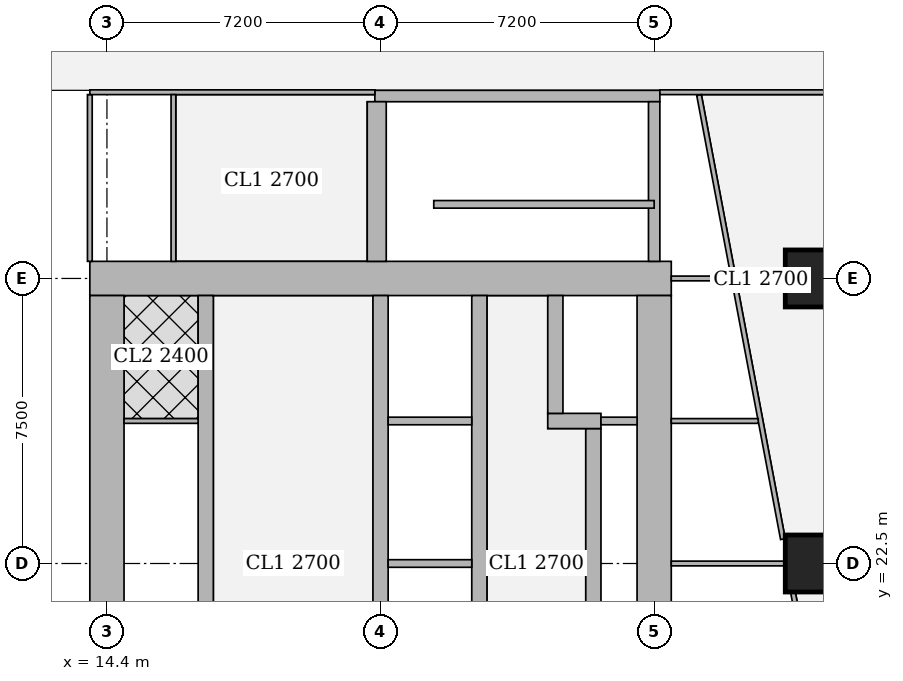
"""IFC4 building model, lengths in metres.
Left out: names, types, materials, properties, quantities, classifications, styles, units other than length and angle.
Written with IfcOpenShell. Run it as: python <this file> out.ifc"""

import sys

from ifc_helpers import new_model, si_unit, direction, frame, frame_2d, origin, origin_2d, place, context, subcontext, project, spatial, rectangle, extrude, element, fill, save


model = new_model("IFC4")
c1 = context("Model", 3, precision=1e-05, world=origin(), true_north=direction((0.0, 1.0)))
c2 = subcontext(c1, "Body", "Model", "MODEL_VIEW")
j1 = project(units=[si_unit("LENGTHUNIT", "METRE"), si_unit("PLANEANGLEUNIT", "RADIAN")], contexts=[c1])
p1 = place(None, origin())
s1 = spatial("IfcSite", under=j1, at=p1, CompositionType="ELEMENT")
p2 = place(p1, origin())
s2 = spatial("IfcBuilding", under=s1, at=p2, CompositionType="ELEMENT")
p3 = place(p2, frame((0.0, 0.0, 147.05)))
s3 = spatial("IfcBuildingStorey", under=s2, at=p3, CompositionType="ELEMENT", Elevation=147.05)
for number, where, z_axis, x_axis in (
    (1, (33.0, 22.5, 0.0), (0.0, 0.0, 1.0), (1.0, 0.0, 0.0)),
    (2, (33.0, 30.0, 0.0), (0.0, 0.0, 1.0), (1.0, 0.0, 0.0)),
):
    element("IfcColumn", number, at=place(p3, frame(where, z_axis=z_axis, x_axis=x_axis)), inside=s3, PredefinedType="COLUMN", context=c2, shape_type="SweptSolid", body=[
        extrude(rectangle(XDim=1.5, YDim=1.5, at=origin_2d()), origin(), (0.0, 0.0, 1.0), 3.75),
    ])
p4 = place(p3, frame((13.95, 30.0, 0.0), z_axis=(0.0, 0.0, 1.0), x_axis=(1.0, 0.0, 0.0)))
e3 = element("IfcWall", 3, at=p4, inside=s3, PredefinedType="SHEAR", context=c2, shape_type="SweptSolid", body=[
    extrude(rectangle(XDim=15.3, YDim=0.9, at=frame_2d((7.65, 0.0))), origin(), (0.0, 0.0, 1.0), 3.75),
])
p5 = place(p4, frame((4.45, 0.0, 0.0)))
e4 = element("IfcOpeningElement", 4, at=p5, cuts=e3, PredefinedType="OPENING", context=c2, shape_type="SweptSolid", body=[
    extrude(rectangle(XDim=1.8, YDim=2.1, at=frame_2d((0.9, 1.05))), frame((0.0, 0.46, 0.0), z_axis=(0.0, -1.0, 0.0), x_axis=(1.0, 0.0, 0.0)), (0.0, 0.0, 1.0), 0.92),
])
p6 = place(p4, frame((10.7, 0.0, 0.0)))
e5 = element("IfcOpeningElement", 5, at=p6, cuts=e3, PredefinedType="OPENING", context=c2, shape_type="SweptSolid", body=[
    extrude(rectangle(XDim=1.1, YDim=2.1, at=frame_2d((0.55, 1.05))), frame((0.0, 0.46, 0.0), z_axis=(0.0, -1.0, 0.0), x_axis=(1.0, 0.0, 0.0)), (0.0, 0.0, 1.0), 0.92),
])
for number, where, z_axis, x_axis in (
    (6, (14.4, 15.45, 0.0), (0.0, 0.0, 1.0), (0.0, 1.0, 0.0)),
    (7, (28.8, 15.45, 0.0), (0.0, 0.0, 1.0), (0.0, 1.0, 0.0)),
):
    element("IfcWall", number, at=place(p3, frame(where, z_axis=z_axis, x_axis=x_axis)), inside=s3, PredefinedType="SHEAR", context=c2, shape_type="SweptSolid", body=[
        extrude(rectangle(XDim=14.1, YDim=0.9, at=frame_2d((7.05, 0.0))), origin(), (0.0, 0.0, 1.0), 3.75),
    ])
p7 = place(p3, frame((17.0, 15.45, 0.0), z_axis=(0.0, 0.0, 1.0), x_axis=(0.0, 1.0, 0.0)))
e8 = element("IfcWall", 8, at=p7, inside=s3, PredefinedType="SHEAR", context=c2, shape_type="SweptSolid", body=[
    extrude(rectangle(XDim=14.1, YDim=0.4, at=frame_2d((7.05, 0.0))), origin(), (0.0, 0.0, 1.0), 3.75),
])
p8 = place(p7, frame((0.925, 0.0, 0.0)))
e9 = element("IfcOpeningElement", 9, at=p8, cuts=e8, PredefinedType="OPENING", context=c2, shape_type="SweptSolid", body=[
    extrude(rectangle(XDim=1.0, YDim=2.1, at=frame_2d((0.5, 1.05))), frame((0.0, 0.21, 0.0), z_axis=(0.0, -1.0, 0.0), x_axis=(1.0, 0.0, 0.0)), (0.0, 0.0, 1.0), 0.42),
])
p9 = place(p7, frame((4.675, 0.0, 0.0)))
e10 = element("IfcOpeningElement", 10, at=p9, cuts=e8, PredefinedType="OPENING", context=c2, shape_type="SweptSolid", body=[
    extrude(rectangle(XDim=1.0, YDim=2.1, at=frame_2d((0.5, 1.05))), frame((0.0, 0.21, 0.0), z_axis=(0.0, -1.0, 0.0), x_axis=(1.0, 0.0, 0.0)), (0.0, 0.0, 1.0), 0.42),
])
p10 = place(p7, frame((8.425, 0.0, 0.0)))
e11 = element("IfcOpeningElement", 11, at=p10, cuts=e8, PredefinedType="OPENING", context=c2, shape_type="SweptSolid", body=[
    extrude(rectangle(XDim=1.0, YDim=2.1, at=frame_2d((0.5, 1.05))), frame((0.0, 0.21, 0.0), z_axis=(0.0, -1.0, 0.0), x_axis=(1.0, 0.0, 0.0)), (0.0, 0.0, 1.0), 0.42),
])
p11 = place(p7, frame((12.175, 0.0, 0.0)))
e12 = element("IfcOpeningElement", 12, at=p11, cuts=e8, PredefinedType="OPENING", context=c2, shape_type="SweptSolid", body=[
    extrude(rectangle(XDim=1.0, YDim=2.1, at=frame_2d((0.5, 1.05))), frame((0.0, 0.21, 0.0), z_axis=(0.0, -1.0, 0.0), x_axis=(1.0, 0.0, 0.0)), (0.0, 0.0, 1.0), 0.42),
])
p12 = place(p3, frame((21.6, 15.45, 0.0), z_axis=(0.0, 0.0, 1.0), x_axis=(0.0, 1.0, 0.0)))
e13 = element("IfcWall", 13, at=p12, inside=s3, PredefinedType="SHEAR", context=c2, shape_type="SweptSolid", body=[
    extrude(rectangle(XDim=14.1, YDim=0.4, at=frame_2d((7.05, 0.0))), origin(), (0.0, 0.0, 1.0), 3.75),
])
p13 = place(p12, frame((0.875, 0.0, 0.0)))
e14 = element("IfcOpeningElement", 14, at=p13, cuts=e13, PredefinedType="OPENING", context=c2, shape_type="SweptSolid", body=[
    extrude(rectangle(XDim=1.1, YDim=2.1, at=frame_2d((0.55, 1.05))), frame((0.0, 0.21, 0.0), z_axis=(0.0, -1.0, 0.0), x_axis=(1.0, 0.0, 0.0)), (0.0, 0.0, 1.0), 0.42),
])
p14 = place(p12, frame((4.625, 0.0, 0.0)))
e15 = element("IfcOpeningElement", 15, at=p14, cuts=e13, PredefinedType="OPENING", context=c2, shape_type="SweptSolid", body=[
    extrude(rectangle(XDim=1.1, YDim=2.1, at=frame_2d((0.55, 1.05))), frame((0.0, 0.21, 0.0), z_axis=(0.0, -1.0, 0.0), x_axis=(1.0, 0.0, 0.0)), (0.0, 0.0, 1.0), 0.42),
])
p15 = place(p12, frame((8.375, 0.0, 0.0)))
e16 = element("IfcOpeningElement", 16, at=p15, cuts=e13, PredefinedType="OPENING", context=c2, shape_type="SweptSolid", body=[
    extrude(rectangle(XDim=1.1, YDim=2.1, at=frame_2d((0.55, 1.05))), frame((0.0, 0.21, 0.0), z_axis=(0.0, -1.0, 0.0), x_axis=(1.0, 0.0, 0.0)), (0.0, 0.0, 1.0), 0.42),
])
p16 = place(p12, frame((12.125, 0.0, 0.0)))
e17 = element("IfcOpeningElement", 17, at=p16, cuts=e13, PredefinedType="OPENING", context=c2, shape_type="SweptSolid", body=[
    extrude(rectangle(XDim=1.1, YDim=2.1, at=frame_2d((0.55, 1.05))), frame((0.0, 0.21, 0.0), z_axis=(0.0, -1.0, 0.0), x_axis=(1.0, 0.0, 0.0)), (0.0, 0.0, 1.0), 0.42),
])
p17 = place(p3, frame((24.2, 15.45, 0.0), z_axis=(0.0, 0.0, 1.0), x_axis=(0.0, 1.0, 0.0)))
e18 = element("IfcWall", 18, at=p17, inside=s3, PredefinedType="SHEAR", context=c2, shape_type="SweptSolid", body=[
    extrude(rectangle(XDim=14.1, YDim=0.4, at=frame_2d((7.05, 0.0))), origin(), (0.0, 0.0, 1.0), 3.75),
])
p18 = place(p3, frame((27.2, 18.95, 0.0), z_axis=(0.0, 0.0, 1.0), x_axis=(0.0, 1.0, 0.0)))
e19 = element("IfcWall", 19, at=p18, inside=s3, PredefinedType="SHEAR", context=c2, shape_type="SweptSolid", body=[
    extrude(rectangle(XDim=7.1, YDim=0.4, at=frame_2d((3.55, 0.0))), origin(), (0.0, 0.0, 1.0), 3.75),
])
p19 = place(p3, frame((26.0, 26.25, 0.0), z_axis=(0.0, 0.0, 1.0), x_axis=(1.0, 0.0, 0.0)))
e20 = element("IfcWall", 20, at=p19, inside=s3, PredefinedType="SHEAR", context=c2, shape_type="SweptSolid", body=[
    extrude(rectangle(XDim=1.4, YDim=0.4, at=frame_2d((0.7, 0.0))), origin(), (0.0, 0.0, 1.0), 3.75),
])
p20 = place(p3, frame((26.2, 26.45, 0.0), z_axis=(0.0, 0.0, 1.0), x_axis=(0.0, 1.0, 0.0)))
e21 = element("IfcWall", 21, at=p20, inside=s3, PredefinedType="SHEAR", context=c2, shape_type="SweptSolid", body=[
    extrude(rectangle(XDim=3.1, YDim=0.4, at=frame_2d((1.55, 0.0))), origin(), (0.0, 0.0, 1.0), 3.75),
])
p21 = place(p20, frame((1.075, 0.0, 0.0)))
e22 = element("IfcOpeningElement", 22, at=p21, cuts=e21, PredefinedType="OPENING", context=c2, shape_type="SweptSolid", body=[
    extrude(rectangle(XDim=1.2, YDim=2.1, at=frame_2d((0.6, 1.05))), frame((0.0, 0.21, 0.0), z_axis=(0.0, -1.0, 0.0), x_axis=(1.0, 0.0, 0.0)), (0.0, 0.0, 1.0), 0.42),
])
p22 = place(p3, frame((21.45, 34.8, 0.0), z_axis=(0.0, 0.0, 1.0), x_axis=(1.0, 0.0, 0.0)))
e23 = element("IfcWall", 23, at=p22, inside=s3, PredefinedType="SHEAR", context=c2, shape_type="SweptSolid", body=[
    extrude(rectangle(XDim=7.5, YDim=0.3, at=frame_2d((3.75, 0.0))), origin(), (0.0, 0.0, 1.0), 3.75),
])
p23 = place(p22, frame((0.5, 0.0, 0.0)))
e24 = element("IfcOpeningElement", 24, at=p23, cuts=e23, PredefinedType="OPENING", context=c2, shape_type="SweptSolid", body=[
    extrude(rectangle(XDim=1.1, YDim=2.1, at=frame_2d((0.55, 1.05))), frame((0.0, 0.16, 0.0), z_axis=(0.0, -1.0, 0.0), x_axis=(1.0, 0.0, 0.0)), (0.0, 0.0, 1.0), 0.32),
])
p24 = place(p3, frame((21.5, 30.45, 0.0), z_axis=(0.0, 0.0, 1.0), x_axis=(0.0, 1.0, 0.0)))
e25 = element("IfcWall", 25, at=p24, inside=s3, PredefinedType="SHEAR", context=c2, shape_type="SweptSolid", body=[
    extrude(rectangle(XDim=4.2, YDim=0.5, at=frame_2d((2.1, 0.0))), origin(), (0.0, 0.0, 1.0), 3.75),
])
p25 = place(p3, frame((28.8, 30.45, 0.0), z_axis=(0.0, 0.0, 1.0), x_axis=(0.0, 1.0, 0.0)))
e26 = element("IfcWall", 26, at=p25, inside=s3, PredefinedType="SHEAR", context=c2, shape_type="SweptSolid", body=[
    extrude(rectangle(XDim=4.2, YDim=0.3, at=frame_2d((2.1, 0.0))), origin(), (0.0, 0.0, 1.0), 3.75),
])
p26 = place(p3, frame((13.95, 30.45, 0.0), z_axis=(0.0, 0.0, 1.0), x_axis=(0.0, 1.0, 0.0)))
e27 = element("IfcWall", 27, at=p26, inside=s3, PredefinedType="PARTITIONING", context=c2, shape_type="SweptSolid", body=[
    extrude(rectangle(XDim=4.387, YDim=0.125, at=frame_2d((2.193, 0.0))), origin(), (0.0, 0.0, 1.0), 3.5),
])
p27 = place(p3, frame((13.95, 34.9, 0.0), z_axis=(0.0, 0.0, 1.0), x_axis=(1.0, 0.0, 0.0)))
e28 = element("IfcWall", 28, at=p27, inside=s3, PredefinedType="PARTITIONING", context=c2, shape_type="SweptSolid", body=[
    extrude(rectangle(XDim=7.5, YDim=0.125, at=frame_2d((3.75, 0.0))), origin(), (0.0, 0.0, 1.0), 3.5),
])
p28 = place(p27, frame((3.95, 0.0, 0.0)))
e29 = element("IfcOpeningElement", 29, at=p28, cuts=e28, PredefinedType="OPENING", context=c2, shape_type="SweptSolid", body=[
    extrude(rectangle(XDim=1.8, YDim=2.1, at=frame_2d((0.9, 1.05))), frame((0.0, 0.073, 0.0), z_axis=(0.0, -1.0, 0.0), x_axis=(1.0, 0.0, 0.0)), (0.0, 0.0, 1.0), 0.145),
])
p29 = place(p3, frame((16.15, 30.45, 0.0), z_axis=(0.0, 0.0, 1.0), x_axis=(0.0, 1.0, 0.0)))
e30 = element("IfcWall", 30, at=p29, inside=s3, PredefinedType="PARTITIONING", context=c2, shape_type="SweptSolid", body=[
    extrude(rectangle(XDim=4.387, YDim=0.125, at=frame_2d((2.193, 0.0))), origin(), (0.0, 0.0, 1.0), 3.5),
])
p30 = place(p29, frame((1.75, 0.0, 0.0)))
e31 = element("IfcOpeningElement", 31, at=p30, cuts=e30, PredefinedType="OPENING", context=c2, shape_type="SweptSolid", body=[
    extrude(rectangle(XDim=1.0, YDim=2.1, at=frame_2d((0.5, 1.05))), frame((0.0, 0.073, 0.0), z_axis=(0.0, -1.0, 0.0), x_axis=(1.0, 0.0, 0.0)), (0.0, 0.0, 1.0), 0.145),
])
p31 = place(p3, frame((28.95, 34.9, 0.0), z_axis=(0.0, 0.0, 1.0), x_axis=(1.0, 0.0, 0.0)))
e32 = element("IfcWall", 32, at=p31, inside=s3, PredefinedType="PARTITIONING", context=c2, shape_type="SweptSolid", body=[
    extrude(rectangle(XDim=4.63, YDim=0.125, at=frame_2d((2.315, 0.0))), origin(), (0.0, 0.0, 1.0), 3.5),
])
p32 = place(p3, frame((34.638, 10.174, 0.0), z_axis=(0.0, 0.0, 1.0), x_axis=(-0.185583626094, 0.982628473903, 0.0)))
e33 = element("IfcWall", 33, at=p32, inside=s3, PredefinedType="PARTITIONING", context=c2, shape_type="SweptSolid", body=[
    extrude(rectangle(XDim=11.767, YDim=0.125, at=frame_2d((5.884, 0.0))), origin(), (0.0, 0.0, 1.0), 3.5),
])
p33 = place(p32, frame((0.697, 0.0, 0.0)))
e34 = element("IfcOpeningElement", 34, at=p33, cuts=e33, PredefinedType="OPENING", context=c2, shape_type="SweptSolid", body=[
    extrude(rectangle(XDim=1.0, YDim=2.1, at=frame_2d((0.5, 1.05))), frame((0.0, 0.073, 0.0), z_axis=(0.0, -1.0, 0.0), x_axis=(1.0, 0.0, 0.0)), (0.0, 0.0, 1.0), 0.145),
])
p34 = place(p32, frame((5.734, 0.0, 0.0)))
e35 = element("IfcOpeningElement", 35, at=p34, cuts=e33, PredefinedType="OPENING", context=c2, shape_type="SweptSolid", body=[
    extrude(rectangle(XDim=1.0, YDim=2.1, at=frame_2d((0.5, 1.05))), frame((0.0, 0.073, 0.0), z_axis=(0.0, -1.0, 0.0), x_axis=(1.0, 0.0, 0.0)), (0.0, 0.0, 1.0), 0.145),
])
p35 = place(p3, frame((32.188, 23.141, 0.0), z_axis=(0.0, 0.0, 1.0), x_axis=(-0.185598625075, 0.98262564101, 0.0)))
e36 = element("IfcWall", 36, at=p35, inside=s3, PredefinedType="PARTITIONING", context=c2, shape_type="SweptSolid", body=[
    extrude(rectangle(XDim=11.891, YDim=0.125, at=frame_2d((5.946, 0.0))), origin(), (0.0, 0.0, 1.0), 3.5),
])
p36 = place(p35, frame((0.171, 0.0, 0.0)))
e37 = element("IfcOpeningElement", 37, at=p36, cuts=e36, PredefinedType="OPENING", context=c2, shape_type="SweptSolid", body=[
    extrude(rectangle(XDim=1.0, YDim=2.1, at=frame_2d((0.5, 1.05))), frame((0.0, 0.073, 0.0), z_axis=(0.0, -1.0, 0.0), x_axis=(1.0, 0.0, 0.0)), (0.0, 0.0, 1.0), 0.145),
])
p37 = place(p35, frame((3.987, 0.0, 0.0)))
e38 = element("IfcOpeningElement", 38, at=p37, cuts=e36, PredefinedType="OPENING", context=c2, shape_type="SweptSolid", body=[
    extrude(rectangle(XDim=1.0, YDim=2.1, at=frame_2d((0.5, 1.05))), frame((0.0, 0.073, 0.0), z_axis=(0.0, -1.0, 0.0), x_axis=(1.0, 0.0, 0.0)), (0.0, 0.0, 1.0), 0.145),
])
p38 = place(p35, frame((7.803, 0.0, 0.0)))
e39 = element("IfcOpeningElement", 39, at=p38, cuts=e36, PredefinedType="OPENING", context=c2, shape_type="SweptSolid", body=[
    extrude(rectangle(XDim=1.0, YDim=2.1, at=frame_2d((0.5, 1.05))), frame((0.0, 0.073, 0.0), z_axis=(0.0, -1.0, 0.0), x_axis=(1.0, 0.0, 0.0)), (0.0, 0.0, 1.0), 0.145),
])
p39 = place(p3, frame((29.25, 22.5, 0.0), z_axis=(0.0, 0.0, 1.0), x_axis=(1.0, 0.0, 0.0)))
e40 = element("IfcWall", 40, at=p39, inside=s3, PredefinedType="PARTITIONING", context=c2, shape_type="SweptSolid", body=[
    extrude(rectangle(XDim=2.996, YDim=0.125, at=frame_2d((1.498, 0.0))), origin(), (0.0, 0.0, 1.0), 3.5),
])
p40 = place(p3, frame((29.25, 26.25, 0.0), z_axis=(0.0, 0.0, 1.0), x_axis=(1.0, 0.0, 0.0)))
e41 = element("IfcWall", 41, at=p40, inside=s3, PredefinedType="PARTITIONING", context=c2, shape_type="SweptSolid", body=[
    extrude(rectangle(XDim=2.288, YDim=0.125, at=frame_2d((1.144, 0.0))), origin(), (0.0, 0.0, 1.0), 3.5),
])
p41 = place(p3, frame((29.25, 30.0, 0.0), z_axis=(0.0, 0.0, 1.0), x_axis=(1.0, 0.0, 0.0)))
e42 = element("IfcWall", 42, at=p41, inside=s3, PredefinedType="PARTITIONING", context=c2, shape_type="SweptSolid", body=[
    extrude(rectangle(XDim=1.579, YDim=0.125, at=frame_2d((0.79, 0.0))), origin(), (0.0, 0.0, 1.0), 3.5),
])
p42 = place(p3, frame((14.85, 26.25, 0.0), z_axis=(0.0, 0.0, 1.0), x_axis=(1.0, 0.0, 0.0)))
e43 = element("IfcWall", 43, at=p42, inside=s3, PredefinedType="PARTITIONING", context=c2, shape_type="SweptSolid", body=[
    extrude(rectangle(XDim=1.95, YDim=0.125, at=frame_2d((0.975, 0.0))), origin(), (0.0, 0.0, 1.0), 3.5),
])
p43 = place(p3, frame((23.0, 31.95, 0.0), z_axis=(0.0, 0.0, 1.0), x_axis=(1.0, 0.0, 0.0)))
e44 = element("IfcWall", 44, at=p43, inside=s3, PredefinedType="SHEAR", context=c2, shape_type="SweptSolid", body=[
    extrude(rectangle(XDim=5.8, YDim=0.2, at=frame_2d((2.9, 0.0))), origin(), (0.0, 0.0, 1.0), 3.75),
])
for number, where, z_axis, x_axis in (
    (45, (21.8, 22.5, 0.0), (0.0, 0.0, 1.0), (1.0, 0.0, 0.0)),
    (46, (21.8, 26.25, 0.0), (0.0, 0.0, 1.0), (1.0, 0.0, 0.0)),
):
    element("IfcWall", number, at=place(p3, frame(where, z_axis=z_axis, x_axis=x_axis)), inside=s3, PredefinedType="SOLIDWALL", context=c2, shape_type="SweptSolid", body=[
        extrude(rectangle(XDim=2.2, YDim=0.2, at=frame_2d((1.1, 0.0))), origin(), (0.0, 0.0, 1.0), 3.5),
    ])
p44 = place(p3, frame((27.4, 26.25, 0.0), z_axis=(0.0, 0.0, 1.0), x_axis=(1.0, 0.0, 0.0)))
e47 = element("IfcWall", 47, at=p44, inside=s3, PredefinedType="SOLIDWALL", context=c2, shape_type="SweptSolid", body=[
    extrude(rectangle(XDim=0.95, YDim=0.2, at=frame_2d((0.475, 0.0))), origin(), (0.0, 0.0, 1.0), 3.5),
])
p45 = place(p30, origin())
e48 = element("IfcDoor", 48, at=p45, inside=s3, OperationType="SINGLE_SWING_RIGHT", PredefinedType="DOOR", context=c2, shape_type="SweptSolid", body=[
    extrude(rectangle(XDim=1.0, YDim=2.1, at=frame_2d((0.5, 1.05))), frame((0.0, 0.025, 0.0), z_axis=(0.0, -1.0, 0.0), x_axis=(1.0, 0.0, 0.0)), (0.0, 0.0, 1.0), 0.05),
])
fill(e31, e48)
p46 = place(p28, origin())
e49 = element("IfcDoor", 49, at=p46, inside=s3, OperationType="DOUBLE_DOOR_SINGLE_SWING", PredefinedType="DOOR", context=c2, shape_type="SweptSolid", body=[
    extrude(rectangle(XDim=1.8, YDim=2.1, at=frame_2d((0.9, 1.05))), frame((0.0, 0.025, 0.0), z_axis=(0.0, -1.0, 0.0), x_axis=(1.0, 0.0, 0.0)), (0.0, 0.0, 1.0), 0.05),
])
fill(e29, e49)
p47 = place(p36, origin())
e50 = element("IfcDoor", 50, at=p47, inside=s3, OperationType="SINGLE_SWING_LEFT", PredefinedType="DOOR", context=c2, shape_type="SweptSolid", body=[
    extrude(rectangle(XDim=1.0, YDim=2.1, at=frame_2d((0.5, 1.05))), frame((0.0, 0.025, 0.0), z_axis=(0.0, -1.0, 0.0), x_axis=(1.0, 0.0, 0.0)), (0.0, 0.0, 1.0), 0.05),
])
fill(e37, e50)
p48 = place(p37, origin())
e51 = element("IfcDoor", 51, at=p48, inside=s3, OperationType="SINGLE_SWING_LEFT", PredefinedType="DOOR", context=c2, shape_type="SweptSolid", body=[
    extrude(rectangle(XDim=1.0, YDim=2.1, at=frame_2d((0.5, 1.05))), frame((0.0, 0.025, 0.0), z_axis=(0.0, -1.0, 0.0), x_axis=(1.0, 0.0, 0.0)), (0.0, 0.0, 1.0), 0.05),
])
fill(e38, e51)
p49 = place(p38, origin())
e52 = element("IfcDoor", 52, at=p49, inside=s3, OperationType="SINGLE_SWING_LEFT", PredefinedType="DOOR", context=c2, shape_type="SweptSolid", body=[
    extrude(rectangle(XDim=1.0, YDim=2.1, at=frame_2d((0.5, 1.05))), frame((0.0, 0.025, 0.0), z_axis=(0.0, -1.0, 0.0), x_axis=(1.0, 0.0, 0.0)), (0.0, 0.0, 1.0), 0.05),
])
fill(e39, e52)
p50 = place(p10, origin())
e53 = element("IfcDoor", 53, at=p50, inside=s3, OperationType="SINGLE_SWING_RIGHT", PredefinedType="DOOR", context=c2, shape_type="SweptSolid", body=[
    extrude(rectangle(XDim=1.0, YDim=2.1, at=frame_2d((0.5, 1.05))), frame((0.0, 0.025, 0.0), z_axis=(0.0, -1.0, 0.0), x_axis=(1.0, 0.0, 0.0)), (0.0, 0.0, 1.0), 0.05),
])
fill(e11, e53)
p51 = place(p11, origin())
e54 = element("IfcDoor", 54, at=p51, inside=s3, OperationType="SINGLE_SWING_RIGHT", PredefinedType="DOOR", context=c2, shape_type="SweptSolid", body=[
    extrude(rectangle(XDim=1.0, YDim=2.1, at=frame_2d((0.5, 1.05))), frame((0.0, 0.025, 0.0), z_axis=(0.0, -1.0, 0.0), x_axis=(1.0, 0.0, 0.0)), (0.0, 0.0, 1.0), 0.05),
])
fill(e12, e54)
p52 = place(p5, origin())
e55 = element("IfcDoor", 55, at=p52, inside=s3, OperationType="DOUBLE_DOOR_SINGLE_SWING", PredefinedType="DOOR", context=c2, shape_type="SweptSolid", body=[
    extrude(rectangle(XDim=1.8, YDim=2.1, at=frame_2d((0.9, 1.05))), frame((0.0, 0.025, 0.0), z_axis=(0.0, -1.0, 0.0), x_axis=(1.0, 0.0, 0.0)), (0.0, 0.0, 1.0), 0.05),
])
fill(e4, e55)
p53 = place(p6, origin())
e56 = element("IfcDoor", 56, at=p53, inside=s3, OperationType="SINGLE_SWING_RIGHT", PredefinedType="DOOR", context=c2, shape_type="SweptSolid", body=[
    extrude(rectangle(XDim=1.1, YDim=2.1, at=frame_2d((0.55, 1.05))), frame((0.0, 0.025, 0.0), z_axis=(0.0, -1.0, 0.0), x_axis=(1.0, 0.0, 0.0)), (0.0, 0.0, 1.0), 0.05),
])
fill(e5, e56)
p54 = place(p21, origin())
e57 = element("IfcDoor", 57, at=p54, inside=s3, OperationType="DOUBLE_DOOR_SLIDING", PredefinedType="DOOR", context=c2, shape_type="SweptSolid", body=[
    extrude(rectangle(XDim=1.2, YDim=2.1, at=frame_2d((0.6, 1.05))), frame((0.0, 0.025, 0.0), z_axis=(0.0, -1.0, 0.0), x_axis=(1.0, 0.0, 0.0)), (0.0, 0.0, 1.0), 0.05),
])
fill(e22, e57)
p55 = place(p15, origin())
e58 = element("IfcDoor", 58, at=p55, inside=s3, OperationType="DOUBLE_DOOR_SLIDING", PredefinedType="DOOR", context=c2, shape_type="SweptSolid", body=[
    extrude(rectangle(XDim=1.1, YDim=2.1, at=frame_2d((0.55, 1.05))), frame((0.0, 0.025, 0.0), z_axis=(0.0, -1.0, 0.0), x_axis=(1.0, 0.0, 0.0)), (0.0, 0.0, 1.0), 0.05),
])
fill(e16, e58)
p56 = place(p16, origin())
e59 = element("IfcDoor", 59, at=p56, inside=s3, OperationType="DOUBLE_DOOR_SLIDING", PredefinedType="DOOR", context=c2, shape_type="SweptSolid", body=[
    extrude(rectangle(XDim=1.1, YDim=2.1, at=frame_2d((0.55, 1.05))), frame((0.0, 0.025, 0.0), z_axis=(0.0, -1.0, 0.0), x_axis=(1.0, 0.0, 0.0)), (0.0, 0.0, 1.0), 0.05),
])
fill(e17, e59)
p57 = place(p23, origin())
e60 = element("IfcDoor", 60, at=p57, inside=s3, OperationType="SINGLE_SWING_RIGHT", PredefinedType="DOOR", context=c2, shape_type="SweptSolid", body=[
    extrude(rectangle(XDim=1.1, YDim=2.1, at=frame_2d((0.55, 1.05))), frame((0.0, 0.025, 0.0), z_axis=(0.0, -1.0, 0.0), x_axis=(1.0, 0.0, 0.0)), (0.0, 0.0, 1.0), 0.05),
])
fill(e24, e60)
save(model, sys.argv[1])
